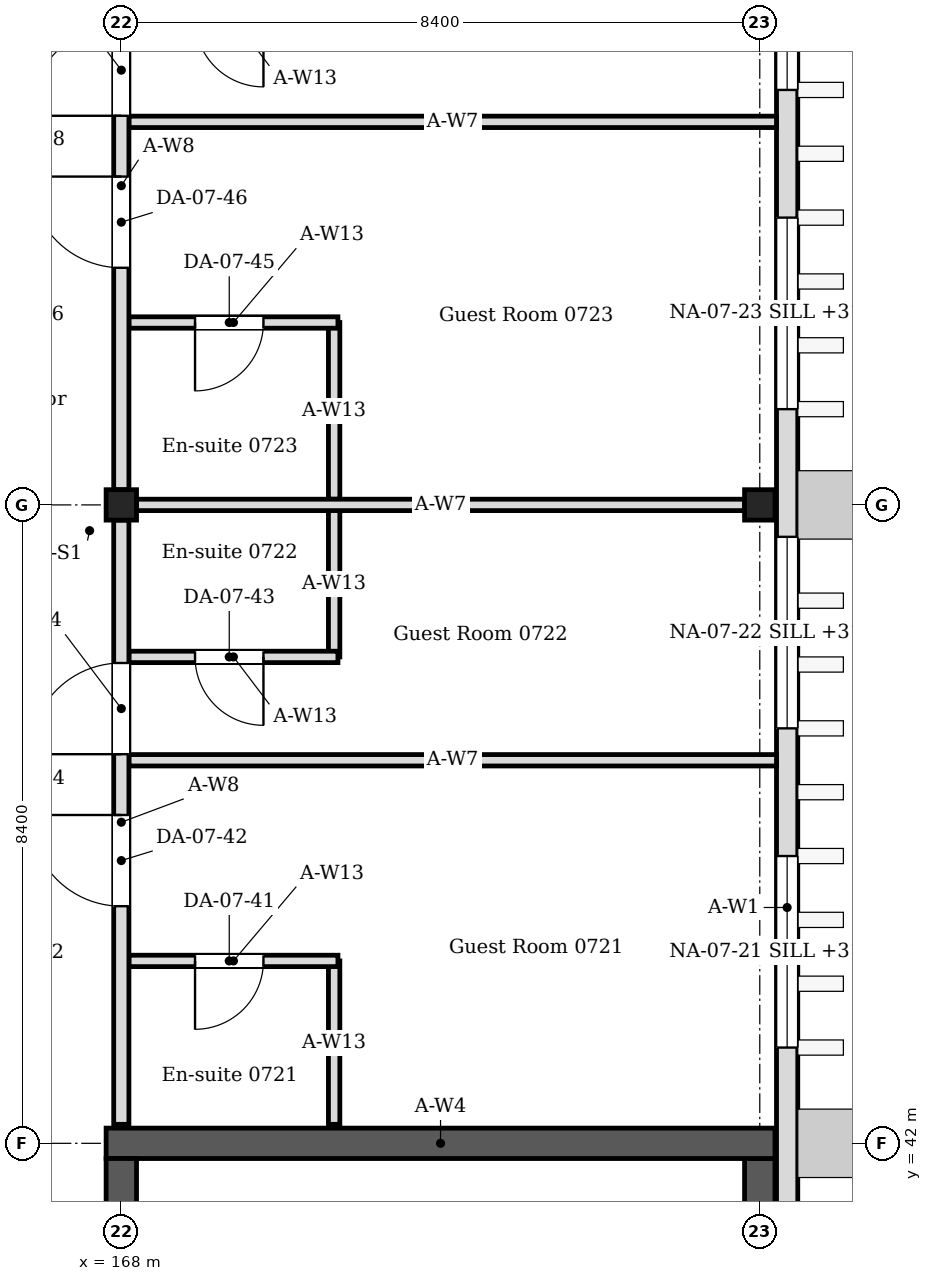
"""IFC4 building model, lengths in metres.
Left out: names, types, materials, properties, quantities, classifications, styles, units other than length and angle.
Written with IfcOpenShell. Run it as: python <this file> out.ifc"""

import sys

from ifc_helpers import new_model, si_unit, direction, frame, frame_2d, origin, origin_2d, place, context, subcontext, project, spatial, rectangle, i_section, extrude, element, fill, save


model = new_model("IFC4")
c1 = context("Model", 3, precision=1e-05, world=origin(), true_north=direction((0.0, 1.0)))
c2 = subcontext(c1, "Body", "Model", "MODEL_VIEW")
j1 = project(units=[si_unit("LENGTHUNIT", "METRE"), si_unit("PLANEANGLEUNIT", "RADIAN")], contexts=[c1])
p1 = place(None, origin())
s1 = spatial("IfcSite", under=j1, at=p1, CompositionType="ELEMENT")
p2 = place(p1, origin())
s2 = spatial("IfcBuilding", under=s1, at=p2, CompositionType="ELEMENT")
p3 = place(p2, frame((0.0, 0.0, 31.2)))
s3 = spatial("IfcBuildingStorey", under=s2, at=p3, CompositionType="ELEMENT", Elevation=31.2)
for number, where, z_axis, x_axis in (
    (1, (168.0, 50.4, 0.0), (0.0, 0.0, 1.0), (1.0, 0.0, 0.0)),
    (2, (176.4, 50.4, 0.0), (0.0, 0.0, 1.0), (1.0, 0.0, 0.0)),
):
    element("IfcColumn", number, at=place(p3, frame(where, z_axis=z_axis, x_axis=x_axis)), inside=s3, PredefinedType="COLUMN", context=c2, shape_type="SweptSolid", body=[
        extrude(i_section(OverallWidth=0.4, OverallDepth=0.4, WebThickness=0.013, FlangeThickness=0.021, FilletRadius=0.022, at=origin_2d()), origin(), (0.0, 0.0, 1.0), 4.2),
    ])
p4 = place(p3, frame((167.8, 42.0, 0.0), z_axis=(0.0, 0.0, 1.0), x_axis=(1.0, 0.0, 0.0)))
e3 = element("IfcWall", 3, at=p4, inside=s3, PredefinedType="SOLIDWALL", context=c2, shape_type="SweptSolid", body=[
    extrude(rectangle(XDim=8.8, YDim=0.4, at=frame_2d((4.4, 0.0))), origin(), (0.0, 0.0, 1.0), 4.05),
])
p5 = place(p3, frame((168.0, 25.4, 0.0), z_axis=(0.0, 0.0, 1.0), x_axis=(0.0, 1.0, 0.0)))
e4 = element("IfcWall", 4, at=p5, inside=s3, PredefinedType="SOLIDWALL", context=c2, shape_type="SweptSolid", body=[
    extrude(rectangle(XDim=16.4, YDim=0.4, at=frame_2d((8.2, 0.0))), origin(), (0.0, 0.0, 1.0), 4.05),
])
p6 = place(p5, frame((1.0, 0.0, 0.0)))
e5 = element("IfcOpeningElement", 5, at=p6, cuts=e4, PredefinedType="OPENING", context=c2, shape_type="SweptSolid", body=[
    extrude(rectangle(XDim=1.0, YDim=2.1, at=frame_2d((0.5, 1.05))), frame((0.0, 0.21, 0.0), z_axis=(0.0, -1.0, 0.0), x_axis=(1.0, 0.0, 0.0)), (0.0, 0.0, 1.0), 0.42),
])
p7 = place(p5, frame((14.4, 0.0, 0.0)))
e6 = element("IfcOpeningElement", 6, at=p7, cuts=e4, PredefinedType="OPENING", context=c2, shape_type="SweptSolid", body=[
    extrude(rectangle(XDim=1.4, YDim=2.1, at=frame_2d((0.7, 1.05))), frame((0.0, 0.21, 0.0), z_axis=(0.0, -1.0, 0.0), x_axis=(1.0, 0.0, 0.0)), (0.0, 0.0, 1.0), 0.42),
])
p8 = place(p3, frame((176.4, 25.4, 0.0), z_axis=(0.0, 0.0, 1.0), x_axis=(0.0, 1.0, 0.0)))
e7 = element("IfcWall", 7, at=p8, inside=s3, PredefinedType="SOLIDWALL", context=c2, shape_type="SweptSolid", body=[
    extrude(rectangle(XDim=16.4, YDim=0.4, at=frame_2d((8.2, 0.0))), origin(), (0.0, 0.0, 1.0), 4.05),
])
p9 = place(p3, frame((176.76, 24.85, 0.0), z_axis=(0.0, 0.0, 1.0), x_axis=(0.0, 1.0, 0.0)))
e8 = element("IfcWall", 8, at=p9, inside=s3, PredefinedType="SOLIDWALL", context=c2, shape_type="SweptSolid", body=[
    extrude(rectangle(XDim=42.57, YDim=0.28, at=frame_2d((21.285, 0.0))), origin(), (0.0, 0.0, 1.0), 4.05),
])
p10 = place(p9, frame((18.41, 0.0, 0.6)))
e9 = element("IfcOpeningElement", 9, at=p10, cuts=e8, PredefinedType="OPENING", context=c2, shape_type="SweptSolid", body=[
    extrude(rectangle(XDim=2.52, YDim=2.4, at=frame_2d((1.26, 1.2))), frame((0.0, 0.15, 0.0), z_axis=(0.0, -1.0, 0.0), x_axis=(1.0, 0.0, 0.0)), (0.0, 0.0, 1.0), 0.3),
])
p11 = place(p9, frame((22.61, 0.0, 0.6)))
e10 = element("IfcOpeningElement", 10, at=p11, cuts=e8, PredefinedType="OPENING", context=c2, shape_type="SweptSolid", body=[
    extrude(rectangle(XDim=2.52, YDim=2.4, at=frame_2d((1.26, 1.2))), frame((0.0, 0.15, 0.0), z_axis=(0.0, -1.0, 0.0), x_axis=(1.0, 0.0, 0.0)), (0.0, 0.0, 1.0), 0.3),
])
p12 = place(p9, frame((26.81, 0.0, 0.6)))
e11 = element("IfcOpeningElement", 11, at=p12, cuts=e8, PredefinedType="OPENING", context=c2, shape_type="SweptSolid", body=[
    extrude(rectangle(XDim=2.52, YDim=2.4, at=frame_2d((1.26, 1.2))), frame((0.0, 0.15, 0.0), z_axis=(0.0, -1.0, 0.0), x_axis=(1.0, 0.0, 0.0)), (0.0, 0.0, 1.0), 0.3),
])
p13 = place(p9, frame((31.01, 0.0, 0.6)))
e12 = element("IfcOpeningElement", 12, at=p13, cuts=e8, PredefinedType="OPENING", context=c2, shape_type="SweptSolid", body=[
    extrude(rectangle(XDim=2.52, YDim=2.4, at=frame_2d((1.26, 1.2))), frame((0.0, 0.15, 0.0), z_axis=(0.0, -1.0, 0.0), x_axis=(1.0, 0.0, 0.0)), (0.0, 0.0, 1.0), 0.3),
])
p14 = place(p3, frame((170.8, 42.25, 0.0), z_axis=(0.0, 0.0, 1.0), x_axis=(0.0, 1.0, 0.0)))
e13 = element("IfcWall", 13, at=p14, inside=s3, PredefinedType="PARTITIONING", context=c2, shape_type="SweptSolid", body=[
    extrude(rectangle(XDim=2.15, YDim=0.15, at=frame_2d((1.075, 0.0))), origin(), (0.0, 0.0, 1.0), 4.05),
])
p15 = place(p3, frame((170.85, 44.4, 0.0), z_axis=(0.0, 0.0, 1.0), x_axis=(-1.0, 0.0, 0.0)))
e14 = element("IfcWall", 14, at=p15, inside=s3, PredefinedType="PARTITIONING", context=c2, shape_type="SweptSolid", body=[
    extrude(rectangle(XDim=2.75, YDim=0.15, at=frame_2d((1.375, 0.0))), origin(), (0.0, 0.0, 1.0), 4.05),
])
p16 = place(p15, frame((0.98, 0.0, 0.0)))
e15 = element("IfcOpeningElement", 15, at=p16, cuts=e14, PredefinedType="OPENING", context=c2, shape_type="SweptSolid", body=[
    extrude(rectangle(XDim=0.9, YDim=2.1, at=frame_2d((0.45, 1.05))), frame((0.0, 0.085, 0.0), z_axis=(0.0, -1.0, 0.0), x_axis=(1.0, 0.0, 0.0)), (0.0, 0.0, 1.0), 0.17),
])
p17 = place(p3, frame((170.8, 48.4, 0.0), z_axis=(0.0, 0.0, 1.0), x_axis=(0.0, 1.0, 0.0)))
e16 = element("IfcWall", 16, at=p17, inside=s3, PredefinedType="PARTITIONING", context=c2, shape_type="SweptSolid", body=[
    extrude(rectangle(XDim=1.925, YDim=0.15, at=frame_2d((0.962, 0.0))), origin(), (0.0, 0.0, 1.0), 4.05),
])
p18 = place(p3, frame((170.85, 48.4, 0.0), z_axis=(0.0, 0.0, 1.0), x_axis=(-1.0, 0.0, 0.0)))
e17 = element("IfcWall", 17, at=p18, inside=s3, PredefinedType="PARTITIONING", context=c2, shape_type="SweptSolid", body=[
    extrude(rectangle(XDim=2.75, YDim=0.15, at=frame_2d((1.375, 0.0))), origin(), (0.0, 0.0, 1.0), 4.05),
])
p19 = place(p18, frame((0.98, 0.0, 0.0)))
e18 = element("IfcOpeningElement", 18, at=p19, cuts=e17, PredefinedType="OPENING", context=c2, shape_type="SweptSolid", body=[
    extrude(rectangle(XDim=0.9, YDim=2.1, at=frame_2d((0.45, 1.05))), frame((0.0, 0.085, 0.0), z_axis=(0.0, -1.0, 0.0), x_axis=(1.0, 0.0, 0.0)), (0.0, 0.0, 1.0), 0.17),
])
p20 = place(p3, frame((170.8, 50.475, 0.0), z_axis=(0.0, 0.0, 1.0), x_axis=(0.0, 1.0, 0.0)))
e19 = element("IfcWall", 19, at=p20, inside=s3, PredefinedType="PARTITIONING", context=c2, shape_type="SweptSolid", body=[
    extrude(rectangle(XDim=2.325, YDim=0.15, at=frame_2d((1.163, 0.0))), origin(), (0.0, 0.0, 1.0), 4.05),
])
p21 = place(p3, frame((170.85, 52.8, 0.0), z_axis=(0.0, 0.0, 1.0), x_axis=(-1.0, 0.0, 0.0)))
e20 = element("IfcWall", 20, at=p21, inside=s3, PredefinedType="PARTITIONING", context=c2, shape_type="SweptSolid", body=[
    extrude(rectangle(XDim=2.75, YDim=0.15, at=frame_2d((1.375, 0.0))), origin(), (0.0, 0.0, 1.0), 4.05),
])
p22 = place(p21, frame((0.98, 0.0, 0.0)))
e21 = element("IfcOpeningElement", 21, at=p22, cuts=e20, PredefinedType="OPENING", context=c2, shape_type="SweptSolid", body=[
    extrude(rectangle(XDim=0.9, YDim=2.1, at=frame_2d((0.45, 1.05))), frame((0.0, 0.085, 0.0), z_axis=(0.0, -1.0, 0.0), x_axis=(1.0, 0.0, 0.0)), (0.0, 0.0, 1.0), 0.17),
])
p23 = place(p3, frame((168.2, 50.4, 0.0), z_axis=(0.0, 0.0, 1.0), x_axis=(1.0, 0.0, 0.0)))
e22 = element("IfcWall", 22, at=p23, inside=s3, PredefinedType="PARTITIONING", context=c2, shape_type="SweptSolid", body=[
    extrude(rectangle(XDim=8.0, YDim=0.15, at=frame_2d((4.0, 0.0))), origin(), (0.0, 0.0, 1.0), 3.604),
])
for number, where, z_axis, x_axis in (
    (23, (168.1, 47.04, 0.0), (0.0, 0.0, 1.0), (1.0, 0.0, 0.0)),
    (24, (168.1, 55.44, 0.0), (0.0, 0.0, 1.0), (1.0, 0.0, 0.0)),
):
    element("IfcWall", number, at=place(p3, frame(where, z_axis=z_axis, x_axis=x_axis)), inside=s3, PredefinedType="PARTITIONING", context=c2, shape_type="SweptSolid", body=[
        extrude(rectangle(XDim=8.52, YDim=0.15, at=frame_2d((4.26, 0.0))), origin(), (0.0, 0.0, 1.0), 3.604),
    ])
p24 = place(p3, frame((168.0, 42.25, 0.0), z_axis=(0.0, 0.0, 1.0), x_axis=(0.0, 1.0, 0.0)))
e25 = element("IfcWall", 25, at=p24, inside=s3, PredefinedType="PARTITIONING", context=c2, shape_type="SweptSolid", body=[
    extrude(rectangle(XDim=7.95, YDim=0.2, at=frame_2d((3.975, 0.0))), origin(), (0.0, 0.0, 1.0), 3.45),
])
p25 = place(p24, frame((2.87, 0.0, 0.0)))
e26 = element("IfcOpeningElement", 26, at=p25, cuts=e25, PredefinedType="OPENING", context=c2, shape_type="SweptSolid", body=[
    extrude(rectangle(XDim=1.2, YDim=2.1, at=frame_2d((0.6, 1.05))), frame((0.0, 0.11, 0.0), z_axis=(0.0, -1.0, 0.0), x_axis=(1.0, 0.0, 0.0)), (0.0, 0.0, 1.0), 0.22),
])
p26 = place(p24, frame((4.87, 0.0, 0.0)))
e27 = element("IfcOpeningElement", 27, at=p26, cuts=e25, PredefinedType="OPENING", context=c2, shape_type="SweptSolid", body=[
    extrude(rectangle(XDim=1.2, YDim=2.1, at=frame_2d((0.6, 1.05))), frame((0.0, 0.11, 0.0), z_axis=(0.0, -1.0, 0.0), x_axis=(1.0, 0.0, 0.0)), (0.0, 0.0, 1.0), 0.22),
])
p27 = place(p3, frame((168.0, 50.6, 0.0), z_axis=(0.0, 0.0, 1.0), x_axis=(0.0, 1.0, 0.0)))
e28 = element("IfcWall", 28, at=p27, inside=s3, PredefinedType="PARTITIONING", context=c2, shape_type="SweptSolid", body=[
    extrude(rectangle(XDim=8.0, YDim=0.2, at=frame_2d((4.0, 0.0))), origin(), (0.0, 0.0, 1.0), 3.45),
])
p28 = place(p27, frame((2.92, 0.0, 0.0)))
e29 = element("IfcOpeningElement", 29, at=p28, cuts=e28, PredefinedType="OPENING", context=c2, shape_type="SweptSolid", body=[
    extrude(rectangle(XDim=1.2, YDim=2.1, at=frame_2d((0.6, 1.05))), frame((0.0, 0.11, 0.0), z_axis=(0.0, -1.0, 0.0), x_axis=(1.0, 0.0, 0.0)), (0.0, 0.0, 1.0), 0.22),
])
p29 = place(p27, frame((4.92, 0.0, 0.0)))
e30 = element("IfcOpeningElement", 30, at=p29, cuts=e28, PredefinedType="OPENING", context=c2, shape_type="SweptSolid", body=[
    extrude(rectangle(XDim=1.2, YDim=2.1, at=frame_2d((0.6, 1.05))), frame((0.0, 0.11, 0.0), z_axis=(0.0, -1.0, 0.0), x_axis=(1.0, 0.0, 0.0)), (0.0, 0.0, 1.0), 0.22),
])
p30 = place(p10, origin())
e31 = element("IfcWindow", 31, at=p30, inside=s3, PartitioningType="SINGLE_PANEL", PredefinedType="WINDOW", context=c2, shape_type="SweptSolid", body=[
    extrude(rectangle(XDim=2.52, YDim=2.4, at=frame_2d((1.26, 1.2))), frame((0.0, 0.03, 0.0), z_axis=(0.0, -1.0, 0.0), x_axis=(1.0, 0.0, 0.0)), (0.0, 0.0, 1.0), 0.06),
])
fill(e9, e31)
p31 = place(p11, origin())
e32 = element("IfcWindow", 32, at=p31, inside=s3, PartitioningType="SINGLE_PANEL", PredefinedType="WINDOW", context=c2, shape_type="SweptSolid", body=[
    extrude(rectangle(XDim=2.52, YDim=2.4, at=frame_2d((1.26, 1.2))), frame((0.0, 0.03, 0.0), z_axis=(0.0, -1.0, 0.0), x_axis=(1.0, 0.0, 0.0)), (0.0, 0.0, 1.0), 0.06),
])
fill(e10, e32)
p32 = place(p12, origin())
e33 = element("IfcWindow", 33, at=p32, inside=s3, PartitioningType="SINGLE_PANEL", PredefinedType="WINDOW", context=c2, shape_type="SweptSolid", body=[
    extrude(rectangle(XDim=2.52, YDim=2.4, at=frame_2d((1.26, 1.2))), frame((0.0, 0.03, 0.0), z_axis=(0.0, -1.0, 0.0), x_axis=(1.0, 0.0, 0.0)), (0.0, 0.0, 1.0), 0.06),
])
fill(e11, e33)
p33 = place(p13, origin())
e34 = element("IfcWindow", 34, at=p33, inside=s3, PartitioningType="SINGLE_PANEL", PredefinedType="WINDOW", context=c2, shape_type="SweptSolid", body=[
    extrude(rectangle(XDim=2.52, YDim=2.4, at=frame_2d((1.26, 1.2))), frame((0.0, 0.03, 0.0), z_axis=(0.0, -1.0, 0.0), x_axis=(1.0, 0.0, 0.0)), (0.0, 0.0, 1.0), 0.06),
])
fill(e12, e34)
p34 = place(p16, origin())
e35 = element("IfcDoor", 35, at=p34, inside=s3, OperationType="SINGLE_SWING_RIGHT", PredefinedType="DOOR", context=c2, shape_type="SweptSolid", body=[
    extrude(rectangle(XDim=0.9, YDim=2.1, at=frame_2d((0.45, 1.05))), frame((0.0, 0.025, 0.0), z_axis=(0.0, -1.0, 0.0), x_axis=(1.0, 0.0, 0.0)), (0.0, 0.0, 1.0), 0.05),
])
fill(e15, e35)
p35 = place(p25, origin())
e36 = element("IfcDoor", 36, at=p35, inside=s3, OperationType="SINGLE_SWING_RIGHT", PredefinedType="DOOR", context=c2, shape_type="SweptSolid", body=[
    extrude(rectangle(XDim=1.2, YDim=2.1, at=frame_2d((0.6, 1.05))), frame((0.0, 0.025, 0.0), z_axis=(0.0, -1.0, 0.0), x_axis=(1.0, 0.0, 0.0)), (0.0, 0.0, 1.0), 0.05),
])
fill(e26, e36)
p36 = place(p19, origin())
e37 = element("IfcDoor", 37, at=p36, inside=s3, OperationType="SINGLE_SWING_LEFT", PredefinedType="DOOR", context=c2, shape_type="SweptSolid", body=[
    extrude(rectangle(XDim=0.9, YDim=2.1, at=frame_2d((0.45, 1.05))), frame((0.0, 0.025, 0.0), z_axis=(0.0, -1.0, 0.0), x_axis=(1.0, 0.0, 0.0)), (0.0, 0.0, 1.0), 0.05),
])
fill(e18, e37)
p37 = place(p26, origin())
e38 = element("IfcDoor", 38, at=p37, inside=s3, OperationType="SINGLE_SWING_LEFT", PredefinedType="DOOR", context=c2, shape_type="SweptSolid", body=[
    extrude(rectangle(XDim=1.2, YDim=2.1, at=frame_2d((0.6, 1.05))), frame((0.0, 0.025, 0.0), z_axis=(0.0, -1.0, 0.0), x_axis=(1.0, 0.0, 0.0)), (0.0, 0.0, 1.0), 0.05),
])
fill(e27, e38)
p38 = place(p22, origin())
e39 = element("IfcDoor", 39, at=p38, inside=s3, OperationType="SINGLE_SWING_RIGHT", PredefinedType="DOOR", context=c2, shape_type="SweptSolid", body=[
    extrude(rectangle(XDim=0.9, YDim=2.1, at=frame_2d((0.45, 1.05))), frame((0.0, 0.025, 0.0), z_axis=(0.0, -1.0, 0.0), x_axis=(1.0, 0.0, 0.0)), (0.0, 0.0, 1.0), 0.05),
])
fill(e21, e39)
p39 = place(p28, origin())
e40 = element("IfcDoor", 40, at=p39, inside=s3, OperationType="SINGLE_SWING_RIGHT", PredefinedType="DOOR", context=c2, shape_type="SweptSolid", body=[
    extrude(rectangle(XDim=1.2, YDim=2.1, at=frame_2d((0.6, 1.05))), frame((0.0, 0.025, 0.0), z_axis=(0.0, -1.0, 0.0), x_axis=(1.0, 0.0, 0.0)), (0.0, 0.0, 1.0), 0.05),
])
fill(e29, e40)
p40 = place(p29, origin())
e41 = element("IfcDoor", 41, at=p40, inside=s3, OperationType="SINGLE_SWING_LEFT", PredefinedType="DOOR", context=c2, shape_type="SweptSolid", body=[
    extrude(rectangle(XDim=1.2, YDim=2.1, at=frame_2d((0.6, 1.05))), frame((0.0, 0.025, 0.0), z_axis=(0.0, -1.0, 0.0), x_axis=(1.0, 0.0, 0.0)), (0.0, 0.0, 1.0), 0.05),
])
fill(e30, e41)
save(model, sys.argv[1])
